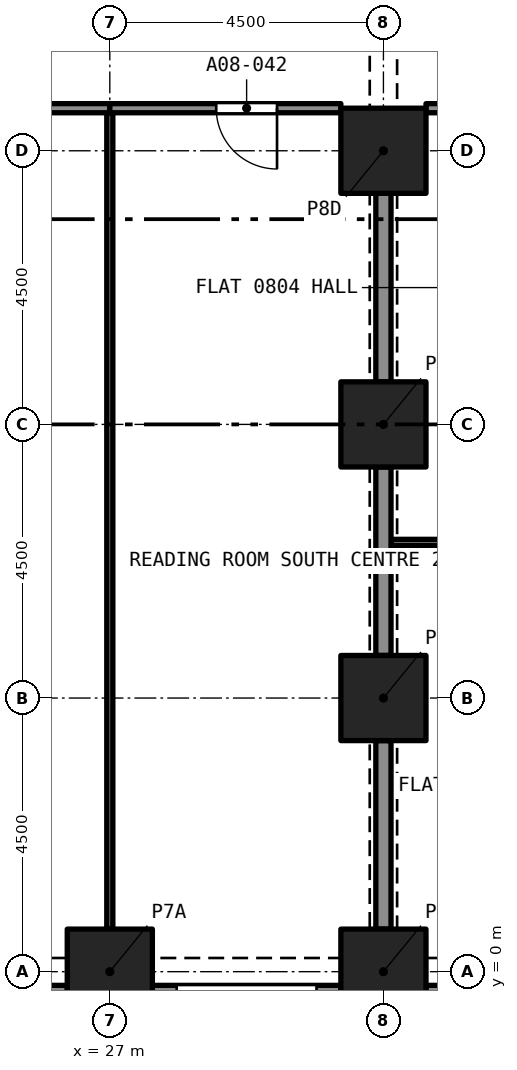
"""IFC4 building model, lengths in metres.
Left out: names, types, materials, properties, quantities, classifications, styles, units other than length and angle.
Written with IfcOpenShell. Run it as: python <this file> out.ifc"""

import sys

from ifc_helpers import new_model, si_unit, direction, frame, frame_2d, origin, origin_2d, place, context, subcontext, project, spatial, rectangle, extrude, element, fill, save


model = new_model("IFC4")
c1 = context("Model", 3, precision=1e-05, world=origin(), true_north=direction((0.0, 1.0)))
c2 = subcontext(c1, "Body", "Model", "MODEL_VIEW")
j1 = project(units=[si_unit("LENGTHUNIT", "METRE"), si_unit("PLANEANGLEUNIT", "RADIAN")], contexts=[c1])
p1 = place(None, origin())
s1 = spatial("IfcSite", under=j1, at=p1, CompositionType="ELEMENT")
p2 = place(p1, origin())
s2 = spatial("IfcBuilding", under=s1, at=p2, CompositionType="ELEMENT")
p3 = place(p2, frame((0.0, 0.0, 36.8)))
s3 = spatial("IfcBuildingStorey", under=s2, at=p3, CompositionType="ELEMENT", Elevation=36.8)
for number, where, z_axis, x_axis in (
    (1, (27.0, 0.0, 0.0), (0.0, 0.0, 1.0), (1.0, 0.0, 0.0)),
    (2, (31.5, 0.0, 0.0), (0.0, 0.0, 1.0), (1.0, 0.0, 0.0)),
    (3, (31.5, 4.5, 0.0), (0.0, 0.0, 1.0), (1.0, 0.0, 0.0)),
    (4, (31.5, 9.0, 0.0), (0.0, 0.0, 1.0), (1.0, 0.0, 0.0)),
    (5, (31.5, 13.5, 0.0), (0.0, 0.0, 1.0), (1.0, 0.0, 0.0)),
):
    element("IfcColumn", number, at=place(p3, frame(where, z_axis=z_axis, x_axis=x_axis)), inside=s3, PredefinedType="COLUMN", context=c2, shape_type="SweptSolid", body=[
        extrude(rectangle(XDim=1.4, YDim=1.4, at=origin_2d()), origin(), (0.0, 0.0, 1.0), 3.2),
    ])
p4 = place(p3, frame((26.3, -0.375, 0.0), z_axis=(0.0, 0.0, 1.0), x_axis=(-1.0, 0.0, 0.0)))
e6 = element("IfcWall", 6, at=p4, inside=s3, PredefinedType="SOLIDWALL", context=c2, shape_type="SweptSolid", body=[
    extrude(rectangle(XDim=3.1, YDim=0.3, at=frame_2d((1.55, 0.0))), origin(), (0.0, 0.0, 1.0), 3.2),
])
p5 = place(p4, frame((0.4, 0.0, 0.45)))
e7 = element("IfcOpeningElement", 7, at=p5, cuts=e6, PredefinedType="OPENING", context=c2, shape_type="SweptSolid", body=[
    extrude(rectangle(XDim=2.3, YDim=1.95, at=frame_2d((1.15, 0.975))), frame((0.0, 0.16, 0.0), z_axis=(0.0, -1.0, 0.0), x_axis=(1.0, 0.0, 0.0)), (0.0, 0.0, 1.0), 0.32),
])
p6 = place(p3, frame((30.8, -0.375, 0.0), z_axis=(0.0, 0.0, 1.0), x_axis=(-1.0, 0.0, 0.0)))
e8 = element("IfcWall", 8, at=p6, inside=s3, PredefinedType="SOLIDWALL", context=c2, shape_type="SweptSolid", body=[
    extrude(rectangle(XDim=3.1, YDim=0.3, at=frame_2d((1.55, 0.0))), origin(), (0.0, 0.0, 1.0), 3.2),
])
p7 = place(p6, frame((0.4, 0.0, 0.45)))
e9 = element("IfcOpeningElement", 9, at=p7, cuts=e8, PredefinedType="OPENING", context=c2, shape_type="SweptSolid", body=[
    extrude(rectangle(XDim=2.3, YDim=1.95, at=frame_2d((1.15, 0.975))), frame((0.0, 0.16, 0.0), z_axis=(0.0, -1.0, 0.0), x_axis=(1.0, 0.0, 0.0)), (0.0, 0.0, 1.0), 0.32),
])
p8 = place(p3, frame((35.3, -0.375, 0.0), z_axis=(0.0, 0.0, 1.0), x_axis=(-1.0, 0.0, 0.0)))
e10 = element("IfcWall", 10, at=p8, inside=s3, PredefinedType="SOLIDWALL", context=c2, shape_type="SweptSolid", body=[
    extrude(rectangle(XDim=3.1, YDim=0.3, at=frame_2d((1.55, 0.0))), origin(), (0.0, 0.0, 1.0), 3.2),
])
p9 = place(p8, frame((0.4, 0.0, 0.45)))
e11 = element("IfcOpeningElement", 11, at=p9, cuts=e10, PredefinedType="OPENING", context=c2, shape_type="SweptSolid", body=[
    extrude(rectangle(XDim=2.3, YDim=1.95, at=frame_2d((1.15, 0.975))), frame((0.0, 0.16, 0.0), z_axis=(0.0, -1.0, 0.0), x_axis=(1.0, 0.0, 0.0)), (0.0, 0.0, 1.0), 0.32),
])
p10 = place(p3, frame((36.0, 7.06, 0.0), z_axis=(0.0, 0.0, 1.0), x_axis=(-1.0, 0.0, 0.0)))
e12 = element("IfcWall", 12, at=p10, inside=s3, PredefinedType="PARTITIONING", context=c2, shape_type="SweptSolid", body=[
    extrude(rectangle(XDim=4.375, YDim=0.1, at=frame_2d((2.188, 0.0))), origin(), (0.0, 0.0, 1.0), 2.9),
])
p11 = place(p10, frame((1.75, 0.0, 0.0)))
e13 = element("IfcOpeningElement", 13, at=p11, cuts=e12, PredefinedType="OPENING", context=c2, shape_type="SweptSolid", body=[
    extrude(rectangle(XDim=1.0, YDim=2.1, at=frame_2d((0.5, 1.05))), frame((0.0, 0.06, 0.0), z_axis=(0.0, -1.0, 0.0), x_axis=(1.0, 0.0, 0.0)), (0.0, 0.0, 1.0), 0.12),
])
p12 = place(p3, frame((31.5, 9.7, 0.0), z_axis=(0.0, 0.0, 1.0), x_axis=(0.0, 1.0, 0.0)))
e14 = element("IfcWall", 14, at=p12, inside=s3, PredefinedType="PARTITIONING", context=c2, shape_type="SweptSolid", body=[
    extrude(rectangle(XDim=3.1, YDim=0.25, at=frame_2d((1.55, 0.0))), origin(), (0.0, 0.0, 1.0), 2.38),
])
p13 = place(p3, frame((34.425, 14.2, 0.0), z_axis=(0.0, 0.0, 1.0), x_axis=(-1.0, 0.0, 0.0)))
e15 = element("IfcWall", 15, at=p13, inside=s3, PredefinedType="PARTITIONING", context=c2, shape_type="SweptSolid", body=[
    extrude(rectangle(XDim=2.225, YDim=0.15, at=frame_2d((1.113, 0.0))), origin(), (0.0, 0.0, 1.0), 2.9),
])
p14 = place(p13, frame((0.175, 0.0, 0.0)))
e16 = element("IfcOpeningElement", 16, at=p14, cuts=e15, PredefinedType="OPENING", context=c2, shape_type="SweptSolid", body=[
    extrude(rectangle(XDim=1.0, YDim=2.1, at=frame_2d((0.5, 1.05))), frame((0.0, 0.085, 0.0), z_axis=(0.0, -1.0, 0.0), x_axis=(1.0, 0.0, 0.0)), (0.0, 0.0, 1.0), 0.17),
])
for number, where, z_axis, x_axis in (
    (17, (31.5, 0.7, 0.0), (0.0, 0.0, 1.0), (0.0, 1.0, 0.0)),
    (18, (31.5, 5.2, 0.0), (0.0, 0.0, 1.0), (0.0, 1.0, 0.0)),
):
    element("IfcWall", number, at=place(p3, frame(where, z_axis=z_axis, x_axis=x_axis)), inside=s3, PredefinedType="PARTITIONING", context=c2, shape_type="SweptSolid", body=[
        extrude(rectangle(XDim=3.1, YDim=0.25, at=frame_2d((1.55, 0.0))), origin(), (0.0, 0.0, 1.0), 2.38),
    ])
p15 = place(p3, frame((27.0, 0.7, 0.0), z_axis=(0.0, 0.0, 1.0), x_axis=(0.0, 1.0, 0.0)))
e19 = element("IfcWall", 19, at=p15, inside=s3, PredefinedType="PARTITIONING", context=c2, shape_type="SweptSolid", body=[
    extrude(rectangle(XDim=13.425, YDim=0.1, at=frame_2d((6.712, 0.0))), origin(), (0.0, 0.0, 1.0), 2.75),
])
p16 = place(p3, frame((27.0, 14.2, 0.0), z_axis=(0.0, 0.0, 1.0), x_axis=(-1.0, 0.0, 0.0)))
e20 = element("IfcWall", 20, at=p16, inside=s3, PredefinedType="PARTITIONING", context=c2, shape_type="SweptSolid", body=[
    extrude(rectangle(XDim=4.5, YDim=0.15, at=frame_2d((2.25, 0.0))), origin(), (0.0, 0.0, 1.0), 2.75),
])
p17 = place(p16, frame((1.75, 0.0, 0.0)))
e21 = element("IfcOpeningElement", 21, at=p17, cuts=e20, PredefinedType="OPENING", context=c2, shape_type="SweptSolid", body=[
    extrude(rectangle(XDim=1.0, YDim=2.1, at=frame_2d((0.5, 1.05))), frame((0.0, 0.085, 0.0), z_axis=(0.0, -1.0, 0.0), x_axis=(1.0, 0.0, 0.0)), (0.0, 0.0, 1.0), 0.17),
])
p18 = place(p3, frame((30.8, 14.2, 0.0), z_axis=(0.0, 0.0, 1.0), x_axis=(-1.0, 0.0, 0.0)))
e22 = element("IfcWall", 22, at=p18, inside=s3, PredefinedType="PARTITIONING", context=c2, shape_type="SweptSolid", body=[
    extrude(rectangle(XDim=3.8, YDim=0.15, at=frame_2d((1.9, 0.0))), origin(), (0.0, 0.0, 1.0), 2.75),
])
p19 = place(p18, frame((1.05, 0.0, 0.0)))
e23 = element("IfcOpeningElement", 23, at=p19, cuts=e22, PredefinedType="OPENING", context=c2, shape_type="SweptSolid", body=[
    extrude(rectangle(XDim=1.0, YDim=2.1, at=frame_2d((0.5, 1.05))), frame((0.0, 0.085, 0.0), z_axis=(0.0, -1.0, 0.0), x_axis=(1.0, 0.0, 0.0)), (0.0, 0.0, 1.0), 0.17),
])
p20 = place(p19, origin())
e24 = element("IfcDoor", 24, at=p20, inside=s3, OperationType="SINGLE_SWING_LEFT", PredefinedType="DOOR", context=c2, shape_type="SweptSolid", body=[
    extrude(rectangle(XDim=1.0, YDim=2.1, at=frame_2d((0.5, 1.05))), frame((0.0, 0.025, 0.0), z_axis=(0.0, -1.0, 0.0), x_axis=(1.0, 0.0, 0.0)), (0.0, 0.0, 1.0), 0.05),
])
fill(e23, e24)
save(model, sys.argv[1])
